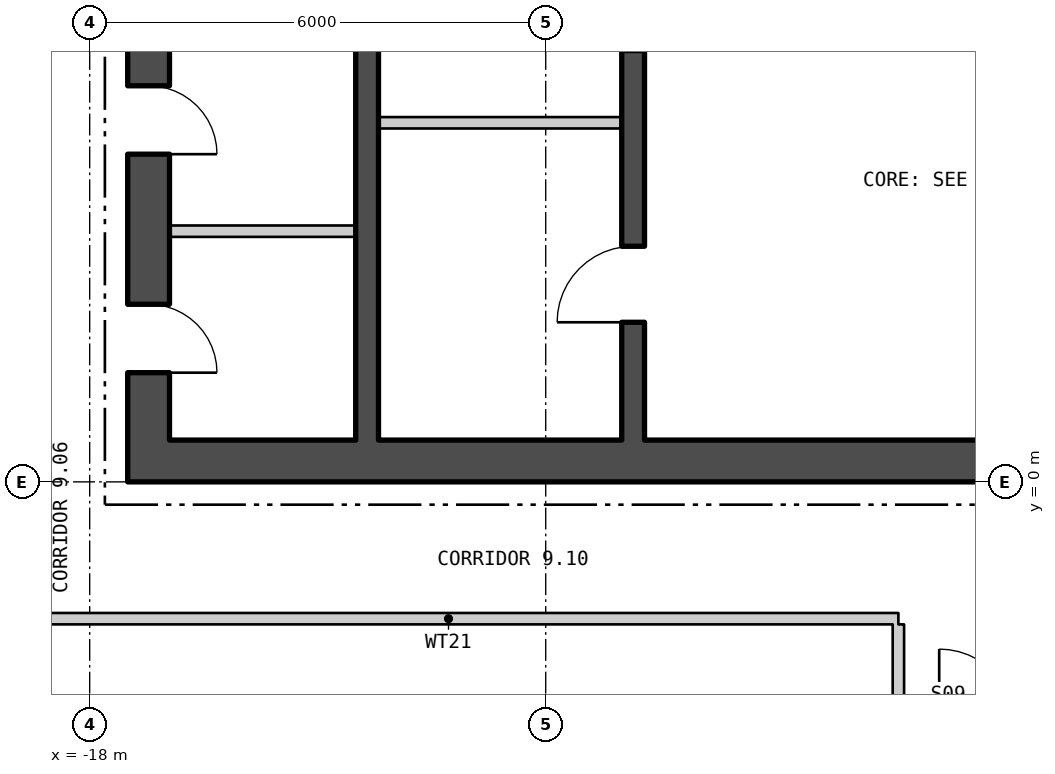
"""IFC4 building model, lengths in metres.
Left out: names, types, materials, properties, quantities, classifications, styles, units other than length and angle.
Written with IfcOpenShell. Run it as: python <this file> out.ifc"""

import sys

from ifc_helpers import new_model, si_unit, direction, frame, frame_2d, origin, place, context, subcontext, project, spatial, polyline, rectangle, outline, extrude, element, fill, save


model = new_model("IFC4")
c1 = context("Model", 3, precision=1e-05, world=origin(), true_north=direction((0.0, 1.0)))
c2 = subcontext(c1, "Body", "Model", "MODEL_VIEW")
j1 = project(units=[si_unit("LENGTHUNIT", "METRE"), si_unit("PLANEANGLEUNIT", "RADIAN")], contexts=[c1])
p1 = place(None, origin())
s1 = spatial("IfcSite", under=j1, at=p1, CompositionType="ELEMENT")
p2 = place(p1, origin())
s2 = spatial("IfcBuilding", under=s1, at=p2, CompositionType="ELEMENT")
p3 = place(p2, frame((0.0, 0.0, 124.8)))
s3 = spatial("IfcBuildingStorey", under=s2, at=p3, CompositionType="ELEMENT", Elevation=124.8)
p4 = place(p3, frame((-27.45, 12.042, -0.18), z_axis=(0.0, 0.0, 1.0), x_axis=(0.500000711659, -0.866024992908, 0.0)))
e1 = element("IfcWall", 1, at=p4, inside=s3, PredefinedType="SOLIDWALL", context=c2, shape_type="SweptSolid", body=[
    extrude(outline(polyline([(-0.13, -0.225), (45.87, -0.225), (45.61, 0.225), (0.13, 0.225), (-0.13, -0.225)])), origin(), (0.0, 0.0, 1.0), 4.28),
])
p5 = place(p4, frame((1.424, 0.0, 1.08)))
e2 = element("IfcOpeningElement", 2, at=p5, cuts=e1, PredefinedType="OPENING", context=c2, shape_type="SweptSolid", body=[
    extrude(rectangle(XDim=2.4, YDim=2.6, at=frame_2d((1.2, 1.3))), frame((0.0, 0.235, 0.0), z_axis=(0.0, -1.0, 0.0), x_axis=(1.0, 0.0, 0.0)), (0.0, 0.0, 1.0), 0.47),
])
p6 = place(p4, frame((5.893, 0.0, 1.08)))
e3 = element("IfcOpeningElement", 3, at=p6, cuts=e1, PredefinedType="OPENING", context=c2, shape_type="SweptSolid", body=[
    extrude(rectangle(XDim=2.4, YDim=2.6, at=frame_2d((1.2, 1.3))), frame((0.0, 0.235, 0.0), z_axis=(0.0, -1.0, 0.0), x_axis=(1.0, 0.0, 0.0)), (0.0, 0.0, 1.0), 0.47),
])
p7 = place(p4, frame((10.401, 0.0, 1.08)))
e4 = element("IfcOpeningElement", 4, at=p7, cuts=e1, PredefinedType="OPENING", context=c2, shape_type="SweptSolid", body=[
    extrude(rectangle(XDim=2.4, YDim=2.6, at=frame_2d((1.2, 1.3))), frame((0.0, 0.235, 0.0), z_axis=(0.0, -1.0, 0.0), x_axis=(1.0, 0.0, 0.0)), (0.0, 0.0, 1.0), 0.47),
])
p8 = place(p4, frame((19.416, 0.0, 1.08)))
e5 = element("IfcOpeningElement", 5, at=p8, cuts=e1, PredefinedType="OPENING", context=c2, shape_type="SweptSolid", body=[
    extrude(rectangle(XDim=2.4, YDim=2.6, at=frame_2d((1.2, 1.3))), frame((0.0, 0.235, 0.0), z_axis=(0.0, -1.0, 0.0), x_axis=(1.0, 0.0, 0.0)), (0.0, 0.0, 1.0), 0.47),
])
p9 = place(p4, frame((23.924, 0.0, 1.08)))
e6 = element("IfcOpeningElement", 6, at=p9, cuts=e1, PredefinedType="OPENING", context=c2, shape_type="SweptSolid", body=[
    extrude(rectangle(XDim=2.4, YDim=2.6, at=frame_2d((1.2, 1.3))), frame((0.0, 0.235, 0.0), z_axis=(0.0, -1.0, 0.0), x_axis=(1.0, 0.0, 0.0)), (0.0, 0.0, 1.0), 0.47),
])
p10 = place(p4, frame((28.431, 0.0, 1.08)))
e7 = element("IfcOpeningElement", 7, at=p10, cuts=e1, PredefinedType="OPENING", context=c2, shape_type="SweptSolid", body=[
    extrude(rectangle(XDim=2.4, YDim=2.6, at=frame_2d((1.2, 1.3))), frame((0.0, 0.235, 0.0), z_axis=(0.0, -1.0, 0.0), x_axis=(1.0, 0.0, 0.0)), (0.0, 0.0, 1.0), 0.47),
])
p11 = place(p4, frame((32.939, 0.0, 1.08)))
e8 = element("IfcOpeningElement", 8, at=p11, cuts=e1, PredefinedType="OPENING", context=c2, shape_type="SweptSolid", body=[
    extrude(rectangle(XDim=2.4, YDim=2.6, at=frame_2d((1.2, 1.3))), frame((0.0, 0.235, 0.0), z_axis=(0.0, -1.0, 0.0), x_axis=(1.0, 0.0, 0.0)), (0.0, 0.0, 1.0), 0.47),
])
p12 = place(p4, frame((37.447, 0.0, 1.08)))
e9 = element("IfcOpeningElement", 9, at=p12, cuts=e1, PredefinedType="OPENING", context=c2, shape_type="SweptSolid", body=[
    extrude(rectangle(XDim=2.4, YDim=2.6, at=frame_2d((1.2, 1.3))), frame((0.0, 0.235, 0.0), z_axis=(0.0, -1.0, 0.0), x_axis=(1.0, 0.0, 0.0)), (0.0, 0.0, 1.0), 0.47),
])
p13 = place(p4, frame((41.916, 0.0, 1.08)))
e10 = element("IfcOpeningElement", 10, at=p13, cuts=e1, PredefinedType="OPENING", context=c2, shape_type="SweptSolid", body=[
    extrude(rectangle(XDim=2.4, YDim=2.6, at=frame_2d((1.2, 1.3))), frame((0.0, 0.235, 0.0), z_axis=(0.0, -1.0, 0.0), x_axis=(1.0, 0.0, 0.0)), (0.0, 0.0, 1.0), 0.47),
])
p14 = place(p3, frame((-17.5, 0.275, 0.0), z_axis=(0.0, 0.0, 1.0), x_axis=(1.0, 0.0, 0.0)))
e11 = element("IfcWall", 11, at=p14, inside=s3, PredefinedType="SHEAR", context=c2, shape_type="SweptSolid", body=[
    extrude(rectangle(XDim=35.0, YDim=0.55, at=frame_2d((17.5, 0.0))), origin(), (0.0, 0.0, 1.0), 4.3),
])
p15 = place(p14, frame((12.0, 0.0, 0.0)))
e12 = element("IfcOpeningElement", 12, at=p15, cuts=e11, PredefinedType="OPENING", context=c2, shape_type="SweptSolid", body=[
    extrude(rectangle(XDim=1.8, YDim=2.4, at=frame_2d((0.9, 1.2))), frame((0.0, 0.285, 0.0), z_axis=(0.0, -1.0, 0.0), x_axis=(1.0, 0.0, 0.0)), (0.0, 0.0, 1.0), 0.57),
])
p16 = place(p14, frame((22.0, 0.0, 0.0)))
e13 = element("IfcOpeningElement", 13, at=p16, cuts=e11, PredefinedType="OPENING", context=c2, shape_type="SweptSolid", body=[
    extrude(rectangle(XDim=1.8, YDim=2.4, at=frame_2d((0.9, 1.2))), frame((0.0, 0.285, 0.0), z_axis=(0.0, -1.0, 0.0), x_axis=(1.0, 0.0, 0.0)), (0.0, 0.0, 1.0), 0.57),
])
p17 = place(p3, frame((-17.225, 0.55, 0.0), z_axis=(0.0, 0.0, 1.0), x_axis=(0.0, 1.0, 0.0)))
e14 = element("IfcWall", 14, at=p17, inside=s3, PredefinedType="SHEAR", context=c2, shape_type="SweptSolid", body=[
    extrude(rectangle(XDim=16.9, YDim=0.55, at=frame_2d((8.45, 0.0))), origin(), (0.0, 0.0, 1.0), 4.3),
])
p18 = place(p17, frame((5.75, 0.0, 0.0)))
e15 = element("IfcOpeningElement", 15, at=p18, cuts=e14, PredefinedType="OPENING", context=c2, shape_type="SweptSolid", body=[
    extrude(rectangle(XDim=1.5, YDim=2.1, at=frame_2d((0.75, 1.05))), frame((0.0, 0.285, 0.0), z_axis=(0.0, -1.0, 0.0), x_axis=(1.0, 0.0, 0.0)), (0.0, 0.0, 1.0), 0.57),
])
p19 = place(p17, frame((0.887, 0.0, 0.0)))
e16 = element("IfcOpeningElement", 16, at=p19, cuts=e14, PredefinedType="OPENING", context=c2, shape_type="SweptSolid", body=[
    extrude(rectangle(XDim=0.9, YDim=2.1, at=frame_2d((0.45, 1.05))), frame((0.0, 0.285, 0.0), z_axis=(0.0, -1.0, 0.0), x_axis=(1.0, 0.0, 0.0)), (0.0, 0.0, 1.0), 0.57),
])
p20 = place(p17, frame((3.762, 0.0, 0.0)))
e17 = element("IfcOpeningElement", 17, at=p20, cuts=e14, PredefinedType="OPENING", context=c2, shape_type="SweptSolid", body=[
    extrude(rectangle(XDim=0.9, YDim=2.1, at=frame_2d((0.45, 1.05))), frame((0.0, 0.285, 0.0), z_axis=(0.0, -1.0, 0.0), x_axis=(1.0, 0.0, 0.0)), (0.0, 0.0, 1.0), 0.57),
])
p21 = place(p17, frame((8.172, 0.0, 0.0)))
e18 = element("IfcOpeningElement", 18, at=p21, cuts=e14, PredefinedType="OPENING", context=c2, shape_type="SweptSolid", body=[
    extrude(rectangle(XDim=1.0, YDim=2.1, at=frame_2d((0.5, 1.05))), frame((0.0, 0.285, 0.0), z_axis=(0.0, -1.0, 0.0), x_axis=(1.0, 0.0, 0.0)), (0.0, 0.0, 1.0), 0.57),
])
p22 = place(p17, frame((11.602, 0.0, 0.0)))
e19 = element("IfcOpeningElement", 19, at=p22, cuts=e14, PredefinedType="OPENING", context=c2, shape_type="SweptSolid", body=[
    extrude(rectangle(XDim=0.9, YDim=2.1, at=frame_2d((0.45, 1.05))), frame((0.0, 0.285, 0.0), z_axis=(0.0, -1.0, 0.0), x_axis=(1.0, 0.0, 0.0)), (0.0, 0.0, 1.0), 0.57),
])
p23 = place(p17, frame((15.08, 0.0, 0.0)))
e20 = element("IfcOpeningElement", 20, at=p23, cuts=e14, PredefinedType="OPENING", context=c2, shape_type="SweptSolid", body=[
    extrude(rectangle(XDim=0.9, YDim=2.1, at=frame_2d((0.45, 1.05))), frame((0.0, 0.285, 0.0), z_axis=(0.0, -1.0, 0.0), x_axis=(1.0, 0.0, 0.0)), (0.0, 0.0, 1.0), 0.57),
])
p24 = place(p3, frame((-10.85, 0.55, 0.0), z_axis=(0.0, 0.0, 1.0), x_axis=(0.0, 1.0, 0.0)))
e21 = element("IfcWall", 21, at=p24, inside=s3, PredefinedType="SHEAR", context=c2, shape_type="SweptSolid", body=[
    extrude(rectangle(XDim=16.9, YDim=0.3, at=frame_2d((8.45, 0.0))), origin(), (0.0, 0.0, 1.0), 4.3),
])
p25 = place(p24, frame((5.125, 0.0, 0.0)))
e22 = element("IfcOpeningElement", 22, at=p25, cuts=e21, PredefinedType="OPENING", context=c2, shape_type="SweptSolid", body=[
    extrude(rectangle(XDim=1.25, YDim=2.1, at=frame_2d((0.625, 1.05))), frame((0.0, 0.16, 0.0), z_axis=(0.0, -1.0, 0.0), x_axis=(1.0, 0.0, 0.0)), (0.0, 0.0, 1.0), 0.32),
])
p26 = place(p24, frame((1.55, 0.0, 0.0)))
e23 = element("IfcOpeningElement", 23, at=p26, cuts=e21, PredefinedType="OPENING", context=c2, shape_type="SweptSolid", body=[
    extrude(rectangle(XDim=1.0, YDim=2.1, at=frame_2d((0.5, 1.05))), frame((0.0, 0.16, 0.0), z_axis=(0.0, -1.0, 0.0), x_axis=(1.0, 0.0, 0.0)), (0.0, 0.0, 1.0), 0.32),
])
p27 = place(p3, frame((-14.35, 0.55, 0.0), z_axis=(0.0, 0.0, 1.0), x_axis=(0.0, 1.0, 0.0)))
e24 = element("IfcWall", 24, at=p27, inside=s3, PredefinedType="SHEAR", context=c2, shape_type="SweptSolid", body=[
    extrude(rectangle(XDim=16.9, YDim=0.3, at=frame_2d((8.45, 0.0))), origin(), (0.0, 0.0, 1.0), 4.3),
])
p28 = place(p27, frame((5.75, 0.0, 0.0)))
e25 = element("IfcOpeningElement", 25, at=p28, cuts=e24, PredefinedType="OPENING", context=c2, shape_type="SweptSolid", body=[
    extrude(rectangle(XDim=1.5, YDim=2.1, at=frame_2d((0.75, 1.05))), frame((0.0, 0.16, 0.0), z_axis=(0.0, -1.0, 0.0), x_axis=(1.0, 0.0, 0.0)), (0.0, 0.0, 1.0), 0.32),
])
p29 = place(p3, frame((-14.2, 4.725, 0.0), z_axis=(0.0, 0.0, 1.0), x_axis=(1.0, 0.0, 0.0)))
e26 = element("IfcWall", 26, at=p29, inside=s3, PredefinedType="PARTITIONING", context=c2, shape_type="SweptSolid", body=[
    extrude(rectangle(XDim=3.2, YDim=0.15, at=frame_2d((1.6, 0.0))), origin(), (0.0, 0.0, 1.0), 4.3),
])
p30 = place(p3, frame((-16.95, 3.299, 0.0), z_axis=(0.0, 0.0, 1.0), x_axis=(1.0, 0.0, 0.0)))
e27 = element("IfcWall", 27, at=p30, inside=s3, PredefinedType="PARTITIONING", context=c2, shape_type="SweptSolid", body=[
    extrude(rectangle(XDim=2.45, YDim=0.15, at=frame_2d((1.225, 0.0))), origin(), (0.0, 0.0, 1.0), 4.3),
])
p31 = place(p3, frame((-19.198, -1.8, 0.0), z_axis=(0.0, 0.0, 1.0), x_axis=(1.0, 0.0, 0.0)))
e28 = element("IfcWall", 28, at=p31, inside=s3, PredefinedType="PARTITIONING", context=c2, shape_type="SweptSolid", body=[
    extrude(rectangle(XDim=11.838, YDim=0.15, at=frame_2d((5.919, 0.0))), origin(), (0.0, 0.0, 1.0), 4.3),
])
p32 = place(p3, frame((-7.36, -3.508, 0.0), z_axis=(0.0, 0.0, 1.0), x_axis=(0.0, 1.0, 0.0)))
e29 = element("IfcWall", 29, at=p32, inside=s3, PredefinedType="PARTITIONING", context=c2, shape_type="SweptSolid", body=[
    extrude(rectangle(XDim=1.633, YDim=0.15, at=frame_2d((0.817, 0.0))), origin(), (0.0, 0.0, 1.0), 4.3),
])
p33 = place(p26, origin())
e30 = element("IfcDoor", 30, at=p33, inside=s3, OperationType="SINGLE_SWING_RIGHT", PredefinedType="DOOR", context=c2, shape_type="SweptSolid", body=[
    extrude(rectangle(XDim=1.0, YDim=2.1, at=frame_2d((0.5, 1.05))), frame((0.0, 0.025, 0.0), z_axis=(0.0, -1.0, 0.0), x_axis=(1.0, 0.0, 0.0)), (0.0, 0.0, 1.0), 0.05),
])
fill(e23, e30)
p34 = place(p19, origin())
e31 = element("IfcDoor", 31, at=p34, inside=s3, OperationType="SINGLE_SWING_LEFT", PredefinedType="DOOR", context=c2, shape_type="SweptSolid", body=[
    extrude(rectangle(XDim=0.9, YDim=2.1, at=frame_2d((0.45, 1.05))), frame((0.0, 0.025, 0.0), z_axis=(0.0, -1.0, 0.0), x_axis=(1.0, 0.0, 0.0)), (0.0, 0.0, 1.0), 0.05),
])
fill(e16, e31)
p35 = place(p20, origin())
e32 = element("IfcDoor", 32, at=p35, inside=s3, OperationType="SINGLE_SWING_LEFT", PredefinedType="DOOR", context=c2, shape_type="SweptSolid", body=[
    extrude(rectangle(XDim=0.9, YDim=2.1, at=frame_2d((0.45, 1.05))), frame((0.0, 0.025, 0.0), z_axis=(0.0, -1.0, 0.0), x_axis=(1.0, 0.0, 0.0)), (0.0, 0.0, 1.0), 0.05),
])
fill(e17, e32)
save(model, sys.argv[1])
